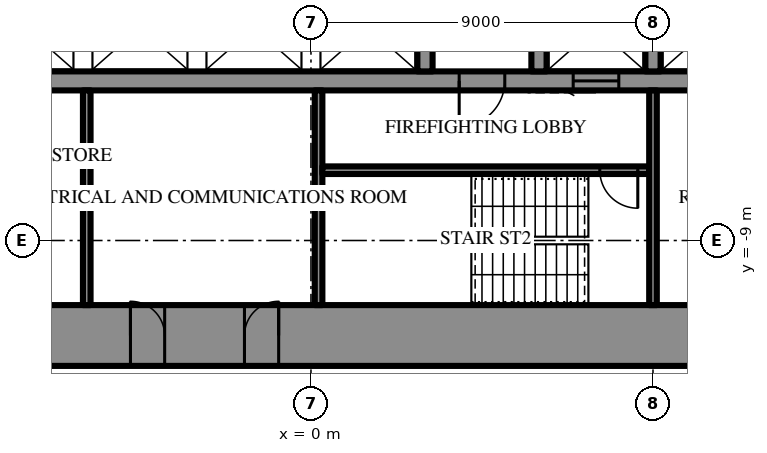
"""IFC4 building model, lengths in metres.
Left out: names, types, materials, properties, quantities, classifications, styles, units other than length and angle.
Written with IfcOpenShell. Run it as: python <this file> out.ifc"""

import sys

from ifc_helpers import new_model, si_unit, direction, frame, frame_2d, origin, place, context, subcontext, project, spatial, rectangle, extrude, element, fill, save


model = new_model("IFC4")
c1 = context("Model", 3, precision=1e-05, world=origin(), true_north=direction((0.0, 1.0)))
c2 = subcontext(c1, "Body", "Model", "MODEL_VIEW")
j1 = project(units=[si_unit("LENGTHUNIT", "METRE"), si_unit("PLANEANGLEUNIT", "RADIAN")], contexts=[c1])
p1 = place(None, origin())
s1 = spatial("IfcSite", under=j1, at=p1, CompositionType="ELEMENT")
p2 = place(p1, origin())
s2 = spatial("IfcBuilding", under=s1, at=p2, CompositionType="ELEMENT")
p3 = place(p2, frame((0.0, 0.0, 190.9)))
s3 = spatial("IfcBuildingStorey", under=s2, at=p3, CompositionType="ELEMENT", Elevation=190.9)
p4 = place(p3, frame((18.6, -11.5, 0.0), z_axis=(0.0, 0.0, 1.0), x_axis=(-1.0, 0.0, 0.0)))
e1 = element("IfcWall", 1, at=p4, inside=s3, PredefinedType="SHEAR", context=c2, shape_type="SweptSolid", body=[
    extrude(rectangle(XDim=37.2, YDim=1.6, at=frame_2d((18.6, 0.0))), origin(), (0.0, 0.0, 1.0), 4.2),
])
p5 = place(p4, frame((19.45, 0.0, 0.0)))
e2 = element("IfcOpeningElement", 2, at=p5, cuts=e1, PredefinedType="OPENING", context=c2, shape_type="SweptSolid", body=[
    extrude(rectangle(XDim=0.9, YDim=2.2, at=frame_2d((0.45, 1.1))), frame((0.0, 0.81, 0.0), z_axis=(0.0, -1.0, 0.0), x_axis=(1.0, 0.0, 0.0)), (0.0, 0.0, 1.0), 1.62),
])
p6 = place(p4, frame((22.45, 0.0, 0.0)))
e3 = element("IfcOpeningElement", 3, at=p6, cuts=e1, PredefinedType="OPENING", context=c2, shape_type="SweptSolid", body=[
    extrude(rectangle(XDim=0.9, YDim=2.2, at=frame_2d((0.45, 1.1))), frame((0.0, 0.81, 0.0), z_axis=(0.0, -1.0, 0.0), x_axis=(1.0, 0.0, 0.0)), (0.0, 0.0, 1.0), 1.62),
])
p7 = place(p4, frame((25.5, 0.0, 0.0)))
e4 = element("IfcOpeningElement", 4, at=p7, cuts=e1, PredefinedType="OPENING", context=c2, shape_type="SweptSolid", body=[
    extrude(rectangle(XDim=1.0, YDim=2.2, at=frame_2d((0.5, 1.1))), frame((0.0, 0.81, 0.0), z_axis=(0.0, -1.0, 0.0), x_axis=(1.0, 0.0, 0.0)), (0.0, 0.0, 1.0), 1.62),
])
p8 = place(p4, frame((1.8, 0.0, 0.0)))
e5 = element("IfcOpeningElement", 5, at=p8, cuts=e1, PredefinedType="OPENING", context=c2, shape_type="SweptSolid", body=[
    extrude(rectangle(XDim=0.9, YDim=2.2, at=frame_2d((0.45, 1.1))), frame((0.0, 0.81, 0.0), z_axis=(0.0, -1.0, 0.0), x_axis=(1.0, 0.0, 0.0)), (0.0, 0.0, 1.0), 1.62),
])
p9 = place(p4, frame((4.65, 0.0, 0.0)))
e6 = element("IfcOpeningElement", 6, at=p9, cuts=e1, PredefinedType="OPENING", context=c2, shape_type="SweptSolid", body=[
    extrude(rectangle(XDim=0.9, YDim=2.2, at=frame_2d((0.45, 1.1))), frame((0.0, 0.81, 0.0), z_axis=(0.0, -1.0, 0.0), x_axis=(1.0, 0.0, 0.0)), (0.0, 0.0, 1.0), 1.62),
])
p10 = place(p4, frame((7.75, 0.0, 0.0)))
e7 = element("IfcOpeningElement", 7, at=p10, cuts=e1, PredefinedType="OPENING", context=c2, shape_type="SweptSolid", body=[
    extrude(rectangle(XDim=0.9, YDim=2.2, at=frame_2d((0.45, 1.1))), frame((0.0, 0.81, 0.0), z_axis=(0.0, -1.0, 0.0), x_axis=(1.0, 0.0, 0.0)), (0.0, 0.0, 1.0), 1.62),
])
p11 = place(p4, frame((28.55, 0.0, 0.0)))
e8 = element("IfcOpeningElement", 8, at=p11, cuts=e1, PredefinedType="OPENING", context=c2, shape_type="SweptSolid", body=[
    extrude(rectangle(XDim=0.9, YDim=2.2, at=frame_2d((0.45, 1.1))), frame((0.0, 0.81, 0.0), z_axis=(0.0, -1.0, 0.0), x_axis=(1.0, 0.0, 0.0)), (0.0, 0.0, 1.0), 1.62),
])
p12 = place(p4, frame((31.65, 0.0, 0.0)))
e9 = element("IfcOpeningElement", 9, at=p12, cuts=e1, PredefinedType="OPENING", context=c2, shape_type="SweptSolid", body=[
    extrude(rectangle(XDim=0.9, YDim=2.2, at=frame_2d((0.45, 1.1))), frame((0.0, 0.81, 0.0), z_axis=(0.0, -1.0, 0.0), x_axis=(1.0, 0.0, 0.0)), (0.0, 0.0, 1.0), 1.62),
])
p13 = place(p4, frame((34.5, 0.0, 0.0)))
e10 = element("IfcOpeningElement", 10, at=p13, cuts=e1, PredefinedType="OPENING", context=c2, shape_type="SweptSolid", body=[
    extrude(rectangle(XDim=0.9, YDim=2.2, at=frame_2d((0.45, 1.1))), frame((0.0, 0.81, 0.0), z_axis=(0.0, -1.0, 0.0), x_axis=(1.0, 0.0, 0.0)), (0.0, 0.0, 1.0), 1.62),
])
p14 = place(p3, frame((11.7, -4.8, 0.0), z_axis=(0.0, 0.0, 1.0), x_axis=(-1.0, 0.0, 0.0)))
e11 = element("IfcWall", 11, at=p14, inside=s3, PredefinedType="SHEAR", context=c2, shape_type="SweptSolid", body=[
    extrude(rectangle(XDim=23.4, YDim=0.5, at=frame_2d((11.7, 0.0))), origin(), (0.0, 0.0, 1.0), 4.2),
])
p15 = place(p14, frame((6.6, 0.0, 0.0)))
e12 = element("IfcOpeningElement", 12, at=p15, cuts=e11, PredefinedType="OPENING", context=c2, shape_type="SweptSolid", body=[
    extrude(rectangle(XDim=1.2, YDim=2.2, at=frame_2d((0.6, 1.1))), frame((0.0, 0.26, 0.0), z_axis=(0.0, -1.0, 0.0), x_axis=(1.0, 0.0, 0.0)), (0.0, 0.0, 1.0), 0.52),
])
p16 = place(p14, frame((3.6, 0.0, 0.0)))
e13 = element("IfcOpeningElement", 13, at=p16, cuts=e11, PredefinedType="OPENING", context=c2, shape_type="SweptSolid", body=[
    extrude(rectangle(XDim=1.2, YDim=2.2, at=frame_2d((0.6, 1.1))), frame((0.0, 0.26, 0.0), z_axis=(0.0, -1.0, 0.0), x_axis=(1.0, 0.0, 0.0)), (0.0, 0.0, 1.0), 0.52),
])
for number, where, z_axis, x_axis in (
    (14, (9.0, -2.25, 0.0), (0.0, 0.0, 1.0), (0.0, -1.0, 0.0)),
    (15, (6.0, -2.25, 0.0), (0.0, 0.0, 1.0), (0.0, -1.0, 0.0)),
    (16, (3.0, -2.25, 0.0), (0.0, 0.0, 1.0), (0.0, -1.0, 0.0)),
):
    element("IfcWall", number, at=place(p3, frame(where, z_axis=z_axis, x_axis=x_axis)), inside=s3, PredefinedType="SHEAR", context=c2, shape_type="SweptSolid", body=[
        extrude(rectangle(XDim=2.3, YDim=0.4, at=frame_2d((1.15, 0.0))), origin(), (0.0, 0.0, 1.0), 4.2),
    ])
p17 = place(p3, frame((0.2, -5.05, 0.0), z_axis=(0.0, 0.0, 1.0), x_axis=(0.0, -1.0, 0.0)))
e17 = element("IfcWall", 17, at=p17, inside=s3, PredefinedType="SHEAR", context=c2, shape_type="SweptSolid", body=[
    extrude(rectangle(XDim=5.65, YDim=0.2, at=frame_2d((2.825, 0.0))), origin(), (0.0, 0.0, 1.0), 4.2),
])
p18 = place(p3, frame((8.9, -7.15, 0.0), z_axis=(0.0, 0.0, 1.0), x_axis=(-1.0, 0.0, 0.0)))
e18 = element("IfcWall", 18, at=p18, inside=s3, PredefinedType="SHEAR", context=c2, shape_type="SweptSolid", body=[
    extrude(rectangle(XDim=8.6, YDim=0.2, at=frame_2d((4.3, 0.0))), origin(), (0.0, 0.0, 1.0), 4.2),
])
p19 = place(p18, frame((0.3, 0.0, 0.0)))
e19 = element("IfcOpeningElement", 19, at=p19, cuts=e18, PredefinedType="OPENING", context=c2, shape_type="SweptSolid", body=[
    extrude(rectangle(XDim=1.0, YDim=2.2, at=frame_2d((0.5, 1.1))), frame((0.0, 0.11, 0.0), z_axis=(0.0, -1.0, 0.0), x_axis=(1.0, 0.0, 0.0)), (0.0, 0.0, 1.0), 0.22),
])
for number, where, z_axis, x_axis in (
    (20, (9.0, -5.05, 0.0), (0.0, 0.0, 1.0), (0.0, -1.0, 0.0)),
    (21, (-5.9, -5.05, 0.0), (0.0, 0.0, 1.0), (0.0, -1.0, 0.0)),
):
    element("IfcWall", number, at=place(p3, frame(where, z_axis=z_axis, x_axis=x_axis)), inside=s3, PredefinedType="PARTITIONING", context=c2, shape_type="SweptSolid", body=[
        extrude(rectangle(XDim=5.65, YDim=0.2, at=frame_2d((2.825, 0.0))), origin(), (0.0, 0.0, 1.0), 4.0),
    ])
p20 = place(p15, origin())
e22 = element("IfcDoor", 22, at=p20, inside=s3, OperationType="SINGLE_SWING_LEFT", PredefinedType="DOOR", context=c2, shape_type="SweptSolid", body=[
    extrude(rectangle(XDim=1.2, YDim=2.2, at=frame_2d((0.6, 1.1))), frame((0.0, 0.025, 0.0), z_axis=(0.0, -1.0, 0.0), x_axis=(1.0, 0.0, 0.0)), (0.0, 0.0, 1.0), 0.05),
])
fill(e12, e22)
p21 = place(p19, origin())
e23 = element("IfcDoor", 23, at=p21, inside=s3, OperationType="SINGLE_SWING_RIGHT", PredefinedType="DOOR", context=c2, shape_type="SweptSolid", body=[
    extrude(rectangle(XDim=1.0, YDim=2.2, at=frame_2d((0.5, 1.1))), frame((0.0, 0.025, 0.0), z_axis=(0.0, -1.0, 0.0), x_axis=(1.0, 0.0, 0.0)), (0.0, 0.0, 1.0), 0.05),
])
fill(e19, e23)
p22 = place(p5, frame((0.9, 0.0, 0.0), z_axis=(0.0, 0.0, 1.0), x_axis=(-1.0, 0.0, 0.0)))
e24 = element("IfcDoor", 24, at=p22, inside=s3, OperationType="SINGLE_SWING_LEFT", PredefinedType="DOOR", context=c2, shape_type="SweptSolid", body=[
    extrude(rectangle(XDim=0.9, YDim=2.2, at=frame_2d((0.45, 1.1))), frame((0.0, 0.025, 0.0), z_axis=(0.0, -1.0, 0.0), x_axis=(1.0, 0.0, 0.0)), (0.0, 0.0, 1.0), 0.05),
])
fill(e2, e24)
p23 = place(p6, frame((0.9, 0.0, 0.0), z_axis=(0.0, 0.0, 1.0), x_axis=(-1.0, 0.0, 0.0)))
e25 = element("IfcDoor", 25, at=p23, inside=s3, OperationType="SINGLE_SWING_RIGHT", PredefinedType="DOOR", context=c2, shape_type="SweptSolid", body=[
    extrude(rectangle(XDim=0.9, YDim=2.2, at=frame_2d((0.45, 1.1))), frame((0.0, 0.025, 0.0), z_axis=(0.0, -1.0, 0.0), x_axis=(1.0, 0.0, 0.0)), (0.0, 0.0, 1.0), 0.05),
])
fill(e3, e25)
p24 = place(p16, origin())
e26 = element("IfcDoor", 26, at=p24, inside=s3, OperationType="SLIDING_TO_LEFT", PredefinedType="DOOR", context=c2, shape_type="SweptSolid", body=[
    extrude(rectangle(XDim=1.2, YDim=2.2, at=frame_2d((0.6, 1.1))), frame((0.0, 0.025, 0.0), z_axis=(0.0, -1.0, 0.0), x_axis=(1.0, 0.0, 0.0)), (0.0, 0.0, 1.0), 0.05),
])
fill(e13, e26)
save(model, sys.argv[1])
